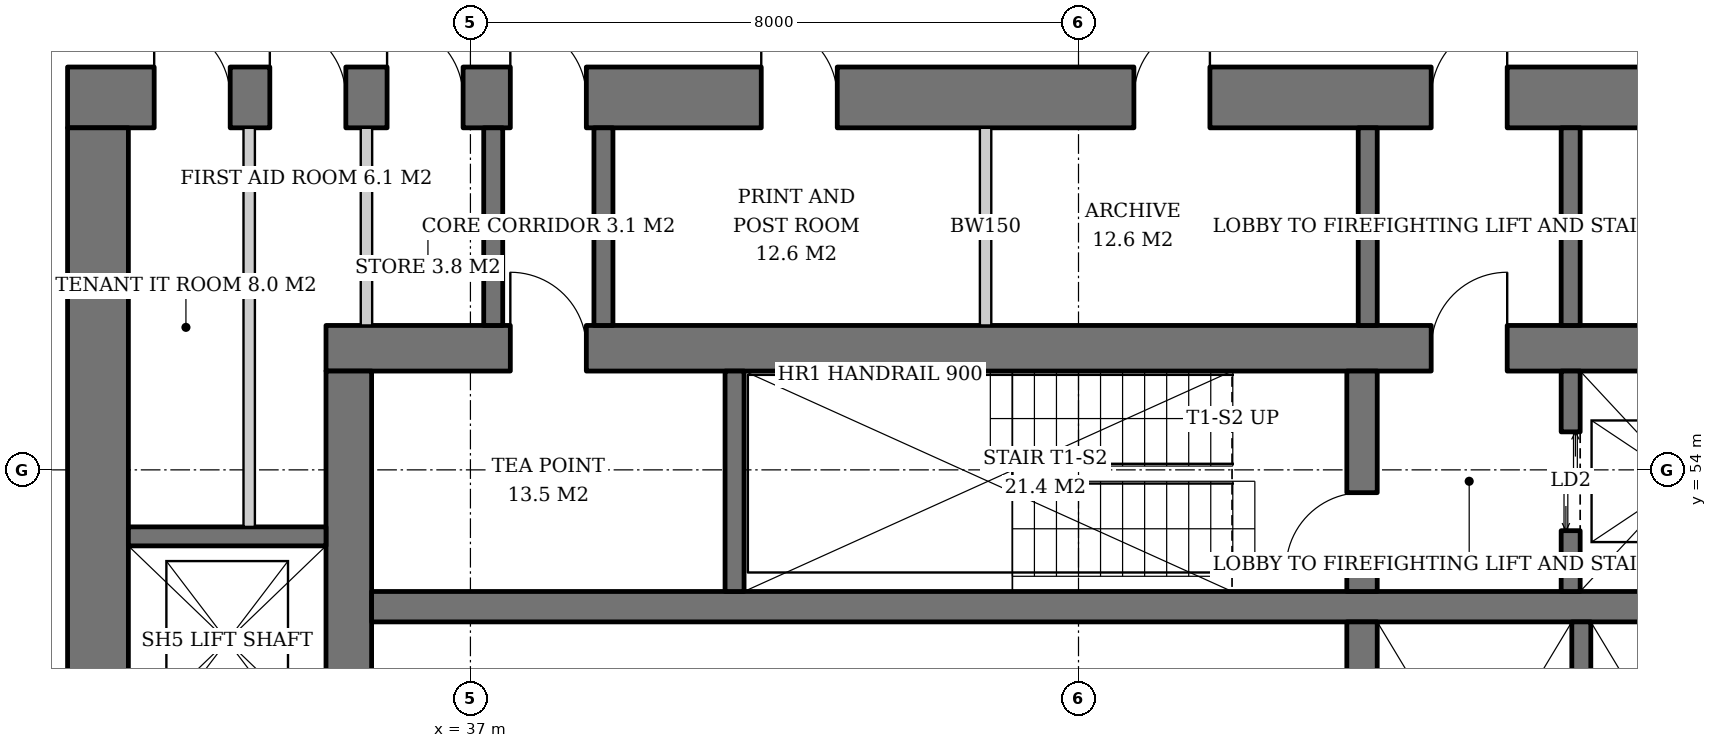
"""IFC4 building model, lengths in metres.
Left out: names, types, materials, properties, quantities, classifications, styles, units other than length and angle.
Written with IfcOpenShell. Run it as: python <this file> out.ifc"""

import sys

from ifc_helpers import new_model, si_unit, direction, frame, frame_2d, origin, place, context, subcontext, project, spatial, rectangle, extrude, element, fill, save


model = new_model("IFC4")
c1 = context("Model", 3, precision=1e-05, world=origin(), true_north=direction((0.0, 1.0)))
c2 = subcontext(c1, "Body", "Model", "MODEL_VIEW")
j1 = project(units=[si_unit("LENGTHUNIT", "METRE"), si_unit("PLANEANGLEUNIT", "RADIAN")], contexts=[c1])
p1 = place(None, origin())
s1 = spatial("IfcSite", under=j1, at=p1, CompositionType="ELEMENT")
p2 = place(p1, origin())
s2 = spatial("IfcBuilding", under=s1, at=p2, CompositionType="ELEMENT")
p3 = place(p2, frame((0.0, 0.0, 32.4)))
s3 = spatial("IfcBuildingStorey", under=s2, at=p3, CompositionType="ELEMENT", Elevation=32.4)
p4 = place(p3, frame((35.1, 55.6, 0.0), z_axis=(0.0, 0.0, 1.0), x_axis=(1.0, 0.0, 0.0)))
e1 = element("IfcWall", 1, at=p4, inside=s3, PredefinedType="SHEAR", context=c2, shape_type="SweptSolid", body=[
    extrude(rectangle(XDim=19.8, YDim=0.6, at=frame_2d((9.9, 0.0))), origin(), (0.0, 0.0, 1.0), 3.8),
])
p5 = place(p4, frame((14.54, 0.0, 0.0)))
e2 = element("IfcOpeningElement", 2, at=p5, cuts=e1, PredefinedType="OPENING", context=c2, shape_type="SweptSolid", body=[
    extrude(rectangle(XDim=1.0, YDim=2.1, at=frame_2d((0.5, 1.05))), frame((0.0, 0.31, 0.0), z_axis=(0.0, -1.0, 0.0), x_axis=(1.0, 0.0, 0.0)), (0.0, 0.0, 1.0), 0.62),
])
p6 = place(p4, frame((2.425, 0.0, 0.0)))
e3 = element("IfcOpeningElement", 3, at=p6, cuts=e1, PredefinedType="OPENING", context=c2, shape_type="SweptSolid", body=[
    extrude(rectangle(XDim=1.0, YDim=2.1, at=frame_2d((0.5, 1.05))), frame((0.0, 0.31, 0.0), z_axis=(0.0, -1.0, 0.0), x_axis=(1.0, 0.0, 0.0)), (0.0, 0.0, 1.0), 0.62),
])
p7 = place(p3, frame((35.4, 36.7, 0.0), z_axis=(0.0, 0.0, 1.0), x_axis=(0.0, 1.0, 0.0)))
e4 = element("IfcWall", 4, at=p7, inside=s3, PredefinedType="SHEAR", context=c2, shape_type="SweptSolid", body=[
    extrude(rectangle(XDim=18.6, YDim=0.6, at=frame_2d((9.3, 0.0))), origin(), (0.0, 0.0, 1.0), 3.8),
])
p8 = place(p7, frame((8.4, 0.0, 0.0)))
e5 = element("IfcOpeningElement", 5, at=p8, cuts=e4, PredefinedType="OPENING", context=c2, shape_type="SweptSolid", body=[
    extrude(rectangle(XDim=1.8, YDim=2.4, at=frame_2d((0.9, 1.2))), frame((0.0, 0.31, 0.0), z_axis=(0.0, -1.0, 0.0), x_axis=(1.0, 0.0, 0.0)), (0.0, 0.0, 1.0), 0.62),
])
p9 = place(p3, frame((31.7, 58.9, 0.0), z_axis=(0.0, 0.0, 1.0), x_axis=(1.0, 0.0, 0.0)))
e6 = element("IfcWall", 6, at=p9, inside=s3, PredefinedType="SHEAR", context=c2, shape_type="SweptSolid", body=[
    extrude(rectangle(XDim=26.6, YDim=0.8, at=frame_2d((13.3, 0.0))), origin(), (0.0, 0.0, 1.0), 3.8),
])
p10 = place(p9, frame((17.94, 0.0, 0.0)))
e7 = element("IfcOpeningElement", 7, at=p10, cuts=e6, PredefinedType="OPENING", context=c2, shape_type="SweptSolid", body=[
    extrude(rectangle(XDim=1.0, YDim=2.1, at=frame_2d((0.5, 1.05))), frame((0.0, 0.41, 0.0), z_axis=(0.0, -1.0, 0.0), x_axis=(1.0, 0.0, 0.0)), (0.0, 0.0, 1.0), 0.82),
])
p11 = place(p9, frame((5.825, 0.0, 0.0)))
e8 = element("IfcOpeningElement", 8, at=p11, cuts=e6, PredefinedType="OPENING", context=c2, shape_type="SweptSolid", body=[
    extrude(rectangle(XDim=1.0, YDim=2.1, at=frame_2d((0.5, 1.05))), frame((0.0, 0.41, 0.0), z_axis=(0.0, -1.0, 0.0), x_axis=(1.0, 0.0, 0.0)), (0.0, 0.0, 1.0), 0.82),
])
p12 = place(p9, frame((1.139, 0.0, 0.0)))
e9 = element("IfcOpeningElement", 9, at=p12, cuts=e6, PredefinedType="OPENING", context=c2, shape_type="SweptSolid", body=[
    extrude(rectangle(XDim=1.0, YDim=2.1, at=frame_2d((0.5, 1.05))), frame((0.0, 0.41, 0.0), z_axis=(0.0, -1.0, 0.0), x_axis=(1.0, 0.0, 0.0)), (0.0, 0.0, 1.0), 0.82),
])
p13 = place(p9, frame((2.661, 0.0, 0.0)))
e10 = element("IfcOpeningElement", 10, at=p13, cuts=e6, PredefinedType="OPENING", context=c2, shape_type="SweptSolid", body=[
    extrude(rectangle(XDim=1.0, YDim=2.1, at=frame_2d((0.5, 1.05))), frame((0.0, 0.41, 0.0), z_axis=(0.0, -1.0, 0.0), x_axis=(1.0, 0.0, 0.0)), (0.0, 0.0, 1.0), 0.82),
])
p14 = place(p9, frame((4.204, 0.0, 0.0)))
e11 = element("IfcOpeningElement", 11, at=p14, cuts=e6, PredefinedType="OPENING", context=c2, shape_type="SweptSolid", body=[
    extrude(rectangle(XDim=1.0, YDim=2.1, at=frame_2d((0.5, 1.05))), frame((0.0, 0.41, 0.0), z_axis=(0.0, -1.0, 0.0), x_axis=(1.0, 0.0, 0.0)), (0.0, 0.0, 1.0), 0.82),
])
p15 = place(p9, frame((9.126, 0.0, 0.0)))
e12 = element("IfcOpeningElement", 12, at=p15, cuts=e6, PredefinedType="OPENING", context=c2, shape_type="SweptSolid", body=[
    extrude(rectangle(XDim=1.0, YDim=2.1, at=frame_2d((0.5, 1.05))), frame((0.0, 0.41, 0.0), z_axis=(0.0, -1.0, 0.0), x_axis=(1.0, 0.0, 0.0)), (0.0, 0.0, 1.0), 0.82),
])
p16 = place(p9, frame((14.029, 0.0, 0.0)))
e13 = element("IfcOpeningElement", 13, at=p16, cuts=e6, PredefinedType="OPENING", context=c2, shape_type="SweptSolid", body=[
    extrude(rectangle(XDim=1.0, YDim=2.1, at=frame_2d((0.5, 1.05))), frame((0.0, 0.41, 0.0), z_axis=(0.0, -1.0, 0.0), x_axis=(1.0, 0.0, 0.0)), (0.0, 0.0, 1.0), 0.82),
])
p17 = place(p9, frame((22.35, 0.0, 0.0)))
e14 = element("IfcOpeningElement", 14, at=p17, cuts=e6, PredefinedType="OPENING", context=c2, shape_type="SweptSolid", body=[
    extrude(rectangle(XDim=1.0, YDim=2.1, at=frame_2d((0.5, 1.05))), frame((0.0, 0.41, 0.0), z_axis=(0.0, -1.0, 0.0), x_axis=(1.0, 0.0, 0.0)), (0.0, 0.0, 1.0), 0.82),
])
p18 = place(p3, frame((32.1, 33.5, 0.0), z_axis=(0.0, 0.0, 1.0), x_axis=(0.0, 1.0, 0.0)))
e15 = element("IfcWall", 15, at=p18, inside=s3, PredefinedType="SHEAR", context=c2, shape_type="SweptSolid", body=[
    extrude(rectangle(XDim=25.0, YDim=0.8, at=frame_2d((12.5, 0.0))), origin(), (0.0, 0.0, 1.0), 3.8),
])
p19 = place(p18, frame((11.6, 0.0, 0.0)))
e16 = element("IfcOpeningElement", 16, at=p19, cuts=e15, PredefinedType="OPENING", context=c2, shape_type="SweptSolid", body=[
    extrude(rectangle(XDim=1.8, YDim=2.4, at=frame_2d((0.9, 1.2))), frame((0.0, 0.41, 0.0), z_axis=(0.0, -1.0, 0.0), x_axis=(1.0, 0.0, 0.0)), (0.0, 0.0, 1.0), 0.82),
])
p20 = place(p3, frame((35.7, 52.2, 0.0), z_axis=(0.0, 0.0, 1.0), x_axis=(1.0, 0.0, 0.0)))
e17 = element("IfcWall", 17, at=p20, inside=s3, PredefinedType="SHEAR", context=c2, shape_type="SweptSolid", body=[
    extrude(rectangle(XDim=18.6, YDim=0.4, at=frame_2d((9.3, 0.0))), origin(), (0.0, 0.0, 1.0), 3.8),
])
p21 = place(p3, frame((48.73, 40.0, 0.0), z_axis=(0.0, 0.0, 1.0), x_axis=(0.0, 1.0, 0.0)))
e18 = element("IfcWall", 18, at=p21, inside=s3, PredefinedType="SHEAR", context=c2, shape_type="SweptSolid", body=[
    extrude(rectangle(XDim=12.0, YDim=0.4, at=frame_2d((6.0, 0.0))), origin(), (0.0, 0.0, 1.0), 3.8),
])
p22 = place(p3, frame((48.73, 52.4, 0.0), z_axis=(0.0, 0.0, 1.0), x_axis=(0.0, 1.0, 0.0)))
e19 = element("IfcWall", 19, at=p22, inside=s3, PredefinedType="SHEAR", context=c2, shape_type="SweptSolid", body=[
    extrude(rectangle(XDim=2.9, YDim=0.4, at=frame_2d((1.45, 0.0))), origin(), (0.0, 0.0, 1.0), 3.8),
])
p23 = place(p22, frame((0.3, 0.0, 0.0)))
e20 = element("IfcOpeningElement", 20, at=p23, cuts=e19, PredefinedType="OPENING", context=c2, shape_type="SweptSolid", body=[
    extrude(rectangle(XDim=1.0, YDim=2.1, at=frame_2d((0.5, 1.05))), frame((0.0, 0.21, 0.0), z_axis=(0.0, -1.0, 0.0), x_axis=(1.0, 0.0, 0.0)), (0.0, 0.0, 1.0), 0.42),
])
p24 = place(p3, frame((40.475, 52.4, 0.0), z_axis=(0.0, 0.0, 1.0), x_axis=(0.0, 1.0, 0.0)))
e21 = element("IfcWall", 21, at=p24, inside=s3, PredefinedType="SHEAR", context=c2, shape_type="SweptSolid", body=[
    extrude(rectangle(XDim=2.9, YDim=0.25, at=frame_2d((1.45, 0.0))), origin(), (0.0, 0.0, 1.0), 3.8),
])
p25 = place(p3, frame((51.475, 52.4, 0.0), z_axis=(0.0, 0.0, 1.0), x_axis=(0.0, 1.0, 0.0)))
e22 = element("IfcWall", 22, at=p25, inside=s3, PredefinedType="SHEAR", context=c2, shape_type="SweptSolid", body=[
    extrude(rectangle(XDim=2.9, YDim=0.25, at=frame_2d((1.45, 0.0))), origin(), (0.0, 0.0, 1.0), 3.8),
])
p26 = place(p25, frame((0.8, 0.0, 0.0)))
e23 = element("IfcOpeningElement", 23, at=p26, cuts=e22, PredefinedType="OPENING", context=c2, shape_type="SweptSolid", body=[
    extrude(rectangle(XDim=1.3, YDim=2.2, at=frame_2d((0.65, 1.1))), frame((0.0, 0.135, 0.0), z_axis=(0.0, -1.0, 0.0), x_axis=(1.0, 0.0, 0.0)), (0.0, 0.0, 1.0), 0.27),
])
p27 = place(p3, frame((51.615, 47.75, 0.0), z_axis=(0.0, 0.0, 1.0), x_axis=(0.0, 1.0, 0.0)))
e24 = element("IfcWall", 24, at=p27, inside=s3, PredefinedType="SHEAR", context=c2, shape_type="SweptSolid", body=[
    extrude(rectangle(XDim=4.25, YDim=0.25, at=frame_2d((2.125, 0.0))), origin(), (0.0, 0.0, 1.0), 3.8),
])
p28 = place(p3, frame((32.5, 53.125, 0.0), z_axis=(0.0, 0.0, 1.0), x_axis=(1.0, 0.0, 0.0)))
e25 = element("IfcWall", 25, at=p28, inside=s3, PredefinedType="SHEAR", context=c2, shape_type="SweptSolid", body=[
    extrude(rectangle(XDim=2.6, YDim=0.25, at=frame_2d((1.3, 0.0))), origin(), (0.0, 0.0, 1.0), 3.8),
])
for number, where, z_axis, x_axis in (
    (26, (48.805, 55.9, 0.0), (0.0, 0.0, 1.0), (0.0, 1.0, 0.0)),
    (27, (51.475, 55.9, 0.0), (0.0, 0.0, 1.0), (0.0, 1.0, 0.0)),
    (28, (37.3, 55.9, 0.0), (0.0, 0.0, 1.0), (0.0, 1.0, 0.0)),
    (29, (38.75, 55.9, 0.0), (0.0, 0.0, 1.0), (0.0, 1.0, 0.0)),
):
    element("IfcWall", number, at=place(p3, frame(where, z_axis=z_axis, x_axis=x_axis)), inside=s3, PredefinedType="SOLIDWALL", context=c2, shape_type="SweptSolid", body=[
        extrude(rectangle(XDim=2.6, YDim=0.25, at=frame_2d((1.3, 0.0))), origin(), (0.0, 0.0, 1.0), 3.62),
    ])
p29 = place(p3, frame((34.09, 53.25, 0.0), z_axis=(0.0, 0.0, 1.0), x_axis=(0.0, 1.0, 0.0)))
e30 = element("IfcWall", 30, at=p29, inside=s3, PredefinedType="SOLIDWALL", context=c2, shape_type="SweptSolid", body=[
    extrude(rectangle(XDim=5.25, YDim=0.15, at=frame_2d((2.625, 0.0))), origin(), (0.0, 0.0, 1.0), 3.62),
])
for number, where, z_axis, x_axis in (
    (31, (35.632, 55.9, 0.0), (0.0, 0.0, 1.0), (0.0, 1.0, 0.0)),
    (32, (43.778, 55.9, 0.0), (0.0, 0.0, 1.0), (0.0, 1.0, 0.0)),
):
    element("IfcWall", number, at=place(p3, frame(where, z_axis=z_axis, x_axis=x_axis)), inside=s3, PredefinedType="SOLIDWALL", context=c2, shape_type="SweptSolid", body=[
        extrude(rectangle(XDim=2.6, YDim=0.15, at=frame_2d((1.3, 0.0))), origin(), (0.0, 0.0, 1.0), 3.62),
    ])
p30 = place(p26, origin())
e33 = element("IfcDoor", 33, at=p30, inside=s3, OperationType="DOUBLE_DOOR_SLIDING", PredefinedType="DOOR", context=c2, shape_type="SweptSolid", body=[
    extrude(rectangle(XDim=1.3, YDim=2.2, at=frame_2d((0.65, 1.1))), frame((0.0, 0.025, 0.0), z_axis=(0.0, -1.0, 0.0), x_axis=(1.0, 0.0, 0.0)), (0.0, 0.0, 1.0), 0.05),
])
fill(e23, e33)
p31 = place(p23, origin())
e34 = element("IfcDoor", 34, at=p31, inside=s3, OperationType="SINGLE_SWING_LEFT", PredefinedType="DOOR", context=c2, shape_type="SweptSolid", body=[
    extrude(rectangle(XDim=1.0, YDim=2.1, at=frame_2d((0.5, 1.05))), frame((0.0, 0.025, 0.0), z_axis=(0.0, -1.0, 0.0), x_axis=(1.0, 0.0, 0.0)), (0.0, 0.0, 1.0), 0.05),
])
fill(e20, e34)
p32 = place(p5, origin())
e35 = element("IfcDoor", 35, at=p32, inside=s3, OperationType="SINGLE_SWING_RIGHT", PredefinedType="DOOR", context=c2, shape_type="SweptSolid", body=[
    extrude(rectangle(XDim=1.0, YDim=2.1, at=frame_2d((0.5, 1.05))), frame((0.0, 0.025, 0.0), z_axis=(0.0, -1.0, 0.0), x_axis=(1.0, 0.0, 0.0)), (0.0, 0.0, 1.0), 0.05),
])
fill(e2, e35)
p33 = place(p10, origin())
e36 = element("IfcDoor", 36, at=p33, inside=s3, OperationType="SINGLE_SWING_RIGHT", PredefinedType="DOOR", context=c2, shape_type="SweptSolid", body=[
    extrude(rectangle(XDim=1.0, YDim=2.1, at=frame_2d((0.5, 1.05))), frame((0.0, 0.025, 0.0), z_axis=(0.0, -1.0, 0.0), x_axis=(1.0, 0.0, 0.0)), (0.0, 0.0, 1.0), 0.05),
])
fill(e7, e36)
p34 = place(p11, origin())
e37 = element("IfcDoor", 37, at=p34, inside=s3, OperationType="SINGLE_SWING_LEFT", PredefinedType="DOOR", context=c2, shape_type="SweptSolid", body=[
    extrude(rectangle(XDim=1.0, YDim=2.1, at=frame_2d((0.5, 1.05))), frame((0.0, 0.025, 0.0), z_axis=(0.0, -1.0, 0.0), x_axis=(1.0, 0.0, 0.0)), (0.0, 0.0, 1.0), 0.05),
])
fill(e8, e37)
p35 = place(p6, origin())
e38 = element("IfcDoor", 38, at=p35, inside=s3, OperationType="SINGLE_SWING_LEFT", PredefinedType="DOOR", context=c2, shape_type="SweptSolid", body=[
    extrude(rectangle(XDim=1.0, YDim=2.1, at=frame_2d((0.5, 1.05))), frame((0.0, -0.24, 0.0), z_axis=(0.0, -1.0, 0.0), x_axis=(1.0, 0.0, 0.0)), (0.0, 0.0, 1.0), 0.05),
])
fill(e3, e38)
p36 = place(p12, origin())
e39 = element("IfcDoor", 39, at=p36, inside=s3, OperationType="SINGLE_SWING_LEFT", PredefinedType="DOOR", context=c2, shape_type="SweptSolid", body=[
    extrude(rectangle(XDim=1.0, YDim=2.1, at=frame_2d((0.5, 1.05))), frame((0.0, -0.34, 0.0), z_axis=(0.0, -1.0, 0.0), x_axis=(1.0, 0.0, 0.0)), (0.0, 0.0, 1.0), 0.05),
])
fill(e9, e39)
p37 = place(p13, origin())
e40 = element("IfcDoor", 40, at=p37, inside=s3, OperationType="SINGLE_SWING_LEFT", PredefinedType="DOOR", context=c2, shape_type="SweptSolid", body=[
    extrude(rectangle(XDim=1.0, YDim=2.1, at=frame_2d((0.5, 1.05))), frame((0.0, -0.34, 0.0), z_axis=(0.0, -1.0, 0.0), x_axis=(1.0, 0.0, 0.0)), (0.0, 0.0, 1.0), 0.05),
])
fill(e10, e40)
p38 = place(p14, origin())
e41 = element("IfcDoor", 41, at=p38, inside=s3, OperationType="SINGLE_SWING_LEFT", PredefinedType="DOOR", context=c2, shape_type="SweptSolid", body=[
    extrude(rectangle(XDim=1.0, YDim=2.1, at=frame_2d((0.5, 1.05))), frame((0.0, -0.34, 0.0), z_axis=(0.0, -1.0, 0.0), x_axis=(1.0, 0.0, 0.0)), (0.0, 0.0, 1.0), 0.05),
])
fill(e11, e41)
p39 = place(p15, origin())
e42 = element("IfcDoor", 42, at=p39, inside=s3, OperationType="SINGLE_SWING_LEFT", PredefinedType="DOOR", context=c2, shape_type="SweptSolid", body=[
    extrude(rectangle(XDim=1.0, YDim=2.1, at=frame_2d((0.5, 1.05))), frame((0.0, -0.34, 0.0), z_axis=(0.0, -1.0, 0.0), x_axis=(1.0, 0.0, 0.0)), (0.0, 0.0, 1.0), 0.05),
])
fill(e12, e42)
p40 = place(p16, origin())
e43 = element("IfcDoor", 43, at=p40, inside=s3, OperationType="SINGLE_SWING_RIGHT", PredefinedType="DOOR", context=c2, shape_type="SweptSolid", body=[
    extrude(rectangle(XDim=1.0, YDim=2.1, at=frame_2d((0.5, 1.05))), frame((0.0, -0.34, 0.0), z_axis=(0.0, -1.0, 0.0), x_axis=(1.0, 0.0, 0.0)), (0.0, 0.0, 1.0), 0.05),
])
fill(e13, e43)
save(model, sys.argv[1])
